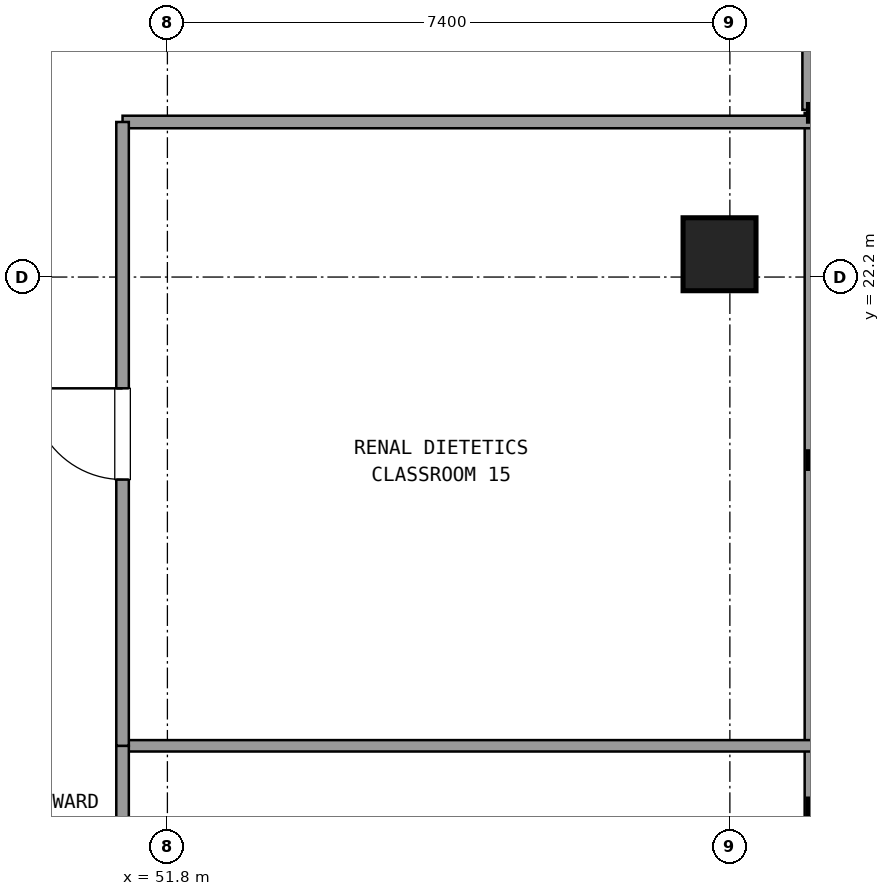
"""IFC4 building model, lengths in metres.
Left out: names, types, materials, properties, quantities, classifications, styles, units other than length and angle.
Written with IfcOpenShell. Run it as: python <this file> out.ifc"""

import sys

from ifc_helpers import new_model, si_unit, direction, frame, frame_2d, origin, origin_2d, place, context, subcontext, project, spatial, rectangle, extrude, element, fill, save


model = new_model("IFC4")
c1 = context("Model", 3, precision=1e-05, world=origin(), true_north=direction((0.0, 1.0)))
c2 = subcontext(c1, "Body", "Model", "MODEL_VIEW")
j1 = project(units=[si_unit("LENGTHUNIT", "METRE"), si_unit("PLANEANGLEUNIT", "RADIAN")], contexts=[c1])
p1 = place(None, origin())
s1 = spatial("IfcSite", under=j1, at=p1, CompositionType="ELEMENT")
p2 = place(p1, origin())
s2 = spatial("IfcBuilding", under=s1, at=p2, CompositionType="ELEMENT")
p3 = place(p2, frame((0.0, 0.0, 156.42)))
s3 = spatial("IfcBuildingStorey", under=s2, at=p3, CompositionType="ELEMENT", Elevation=156.42)
p4 = place(p3, frame((59.064, 22.5, 0.0), z_axis=(0.0, 0.0, 1.0), x_axis=(1.0, 0.0, 0.0)))
e1 = element("IfcColumn", 1, at=p4, inside=s3, PredefinedType="COLUMN", context=c2, shape_type="SweptSolid", body=[
    extrude(rectangle(XDim=0.96, YDim=0.96, at=origin_2d()), origin(), (0.0, 0.0, 1.0), 3.6),
])
p5 = place(p3, frame((60.304, 24.4, 0.0), z_axis=(0.0, 0.0, 1.0), x_axis=(0.0, 1.0, 0.0)))
e2 = element("IfcWall", 2, at=p5, inside=s3, PredefinedType="SOLIDWALL", context=c2, shape_type="SweptSolid", body=[
    extrude(rectangle(XDim=3.0, YDim=0.3, at=frame_2d((1.5, 0.0))), origin(), (0.0, 0.0, 1.0), 2.67),
])
p6 = place(p5, frame((0.9, 0.0, 0.0)))
e3 = element("IfcOpeningElement", 3, at=p6, cuts=e2, PredefinedType="OPENING", context=c2, shape_type="SweptSolid", body=[
    extrude(rectangle(XDim=1.2, YDim=2.2, at=frame_2d((0.6, 1.1))), frame((0.0, 0.16, 0.0), z_axis=(0.0, -1.0, 0.0), x_axis=(1.0, 0.0, 0.0)), (0.0, 0.0, 1.0), 0.32),
])
p7 = place(p3, frame((60.304, 10.655, 0.0), z_axis=(0.0, 0.0, 1.0), x_axis=(0.0, 1.0, 0.0)))
e4 = element("IfcWall", 4, at=p7, inside=s3, PredefinedType="SOLIDWALL", context=c2, shape_type="SweptSolid", body=[
    extrude(rectangle(XDim=13.705, YDim=0.24, at=frame_2d((6.853, 0.0))), origin(), (0.0, 0.0, 1.0), 0.85),
])
p8 = place(p3, frame((51.21, 24.24, 0.0), z_axis=(0.0, 0.0, 1.0), x_axis=(1.0, 0.0, 0.0)))
e5 = element("IfcWall", 5, at=p8, inside=s3, PredefinedType="PARTITIONING", context=c2, shape_type="SweptSolid", body=[
    extrude(rectangle(XDim=9.074, YDim=0.165, at=frame_2d((4.537, 0.0))), origin(), (0.0, 0.0, 1.0), 2.61),
])
p9 = place(p3, frame((51.21, 16.033, 0.0), z_axis=(0.0, 0.0, 1.0), x_axis=(1.0, 0.0, 0.0)))
e6 = element("IfcWall", 6, at=p9, inside=s3, PredefinedType="PARTITIONING", context=c2, shape_type="SweptSolid", body=[
    extrude(rectangle(XDim=9.074, YDim=0.15, at=frame_2d((4.537, 0.0))), origin(), (0.0, 0.0, 1.0), 2.61),
])
p10 = place(p3, frame((51.21, 4.7, 0.0), z_axis=(0.0, 0.0, 1.0), x_axis=(0.0, 1.0, 0.0)))
e7 = element("IfcWall", 7, at=p10, inside=s3, PredefinedType="PARTITIONING", context=c2, shape_type="SweptSolid", body=[
    extrude(rectangle(XDim=11.333, YDim=0.165, at=frame_2d((5.667, 0.0))), origin(), (0.0, 0.0, 1.0), 2.61),
])
p11 = place(p10, frame((5.067, 0.0, 0.0)))
e8 = element("IfcOpeningElement", 8, at=p11, cuts=e7, PredefinedType="OPENING", context=c2, shape_type="SweptSolid", body=[
    extrude(rectangle(XDim=1.2, YDim=2.15, at=frame_2d((0.6, 1.075))), frame((0.0, 0.093, 0.0), z_axis=(0.0, -1.0, 0.0), x_axis=(1.0, 0.0, 0.0)), (0.0, 0.0, 1.0), 0.185),
])
p12 = place(p3, frame((51.21, 16.033, 0.0), z_axis=(0.0, 0.0, 1.0), x_axis=(0.0, 1.0, 0.0)))
e9 = element("IfcWall", 9, at=p12, inside=s3, PredefinedType="PARTITIONING", context=c2, shape_type="SweptSolid", body=[
    extrude(rectangle(XDim=8.207, YDim=0.165, at=frame_2d((4.104, 0.0))), origin(), (0.0, 0.0, 1.0), 2.61),
])
p13 = place(p12, frame((3.503, 0.0, 0.0)))
e10 = element("IfcOpeningElement", 10, at=p13, cuts=e9, PredefinedType="OPENING", context=c2, shape_type="SweptSolid", body=[
    extrude(rectangle(XDim=1.2, YDim=2.15, at=frame_2d((0.6, 1.075))), frame((0.0, 0.093, 0.0), z_axis=(0.0, -1.0, 0.0), x_axis=(1.0, 0.0, 0.0)), (0.0, 0.0, 1.0), 0.185),
])
p14 = place(p13, origin())
e11 = element("IfcDoor", 11, at=p14, inside=s3, OperationType="SINGLE_SWING_RIGHT", PredefinedType="DOOR", context=c2, shape_type="SweptSolid", body=[
    extrude(rectangle(XDim=1.2, YDim=2.15, at=frame_2d((0.6, 1.075))), frame((0.0, 0.025, 0.0), z_axis=(0.0, -1.0, 0.0), x_axis=(1.0, 0.0, 0.0)), (0.0, 0.0, 1.0), 0.05),
])
fill(e10, e11)
save(model, sys.argv[1])
